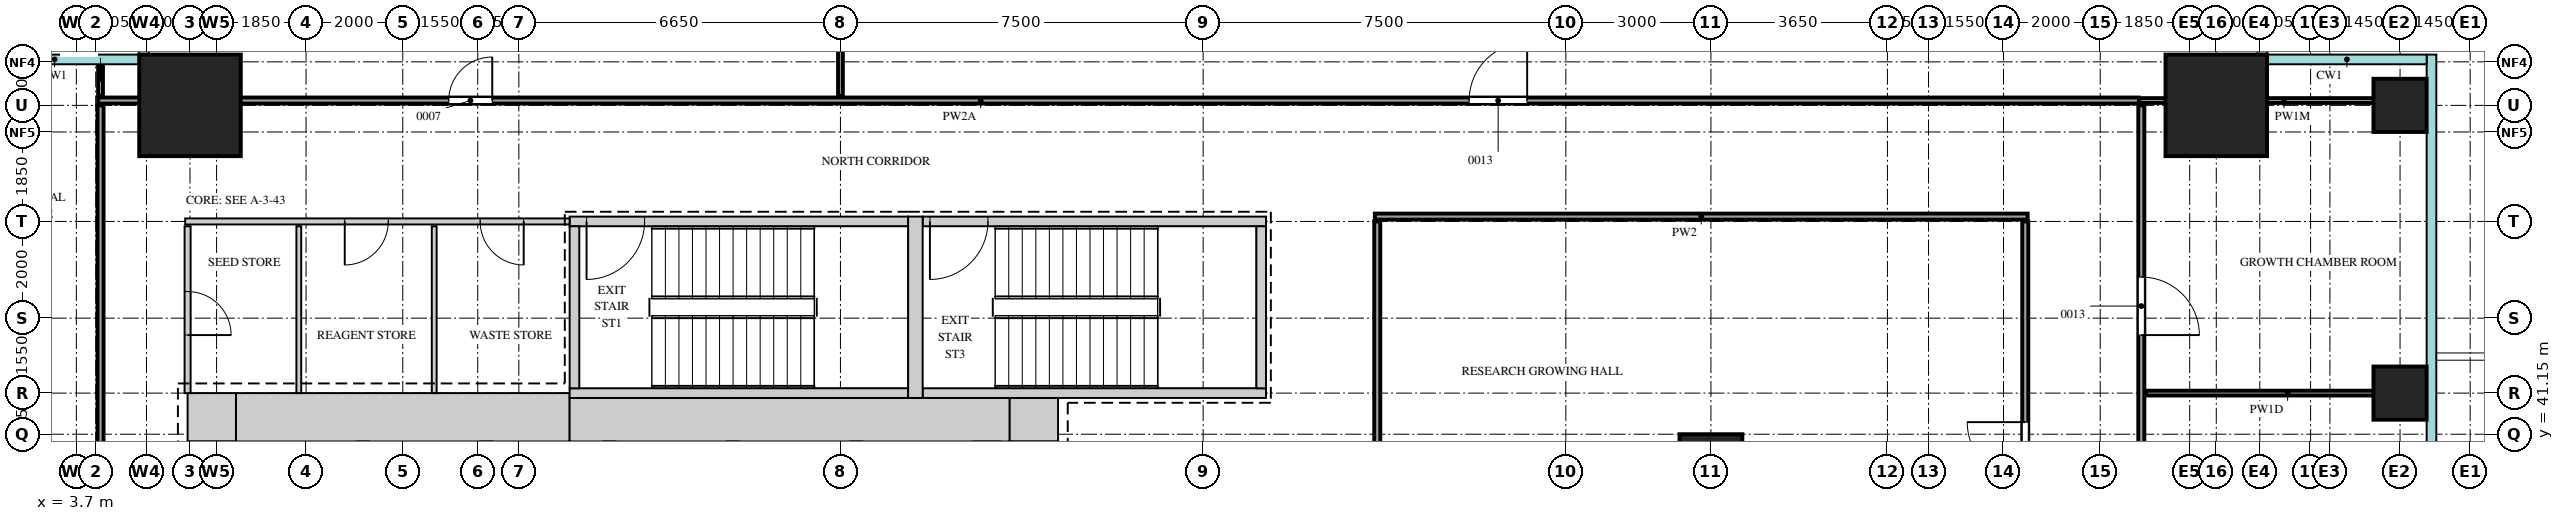
"""IFC4 building model, lengths in metres.
Left out: names, types, materials, properties, quantities, classifications, styles, units other than length and angle.
Written with IfcOpenShell. Run it as: python <this file> out.ifc"""

import sys

from ifc_helpers import new_model, si_unit, direction, frame, frame_2d, origin, origin_2d, place, context, subcontext, project, spatial, rectangle, extrude, source, transform, mapped, element, fill, save


model = new_model("IFC4")
c1 = context("Model", 3, precision=1e-05, world=origin(), true_north=direction((0.0, 1.0)))
c2 = subcontext(c1, "Body", "Model", "MODEL_VIEW")
j1 = project(units=[si_unit("LENGTHUNIT", "METRE"), si_unit("PLANEANGLEUNIT", "RADIAN")], contexts=[c1])
p1 = place(None, origin())
s1 = spatial("IfcSite", under=j1, at=p1, CompositionType="ELEMENT")
p2 = place(p1, origin())
s2 = spatial("IfcBuilding", under=s1, at=p2, CompositionType="ELEMENT")
p3 = place(p2, frame((0.0, 0.0, 110.3)))
s3 = spatial("IfcBuildingStorey", under=s2, at=p3, CompositionType="ELEMENT", Elevation=110.3)
m1 = source(origin(), c2, "Body", "SweptSolid", [
    extrude(rectangle(XDim=6.9, YDim=1.0, at=frame_2d((3.45, 0.0))), origin(), (0.0, 0.0, 1.0), 4.1),
])
p4 = place(p3, frame((7.0, 41.5, 0.0), z_axis=(0.0, 0.0, 1.0), x_axis=(1.0, 0.0, 0.0)))
e1 = element("IfcWall", 1, at=p4, inside=s3, PredefinedType="SHEAR", context=c2, shape_type="MappedRepresentation", body=[
    mapped(m1, transform((0.0, 0.0, 0.0))),
])
m2 = source(origin(), c2, "Body", "SweptSolid", [
    extrude(rectangle(XDim=9.1, YDim=0.9, at=frame_2d((4.55, 0.0))), origin(), (0.0, 0.0, 1.0), 4.1),
])
p5 = place(p3, frame((13.9, 41.45, 0.0), z_axis=(0.0, 0.0, 1.0), x_axis=(1.0, 0.0, 0.0)))
e2 = element("IfcWall", 2, at=p5, inside=s3, PredefinedType="SHEAR", context=c2, shape_type="MappedRepresentation", body=[
    mapped(m2, transform((0.0, 0.0, 0.0))),
])
m3 = source(origin(), c2, "Body", "SweptSolid", [
    extrude(rectangle(XDim=1.0, YDim=0.9, at=frame_2d((0.5, 0.0))), origin(), (0.0, 0.0, 1.0), 4.1),
])
p6 = place(p3, frame((23.0, 41.45, 0.0), z_axis=(0.0, 0.0, 1.0), x_axis=(1.0, 0.0, 0.0)))
e3 = element("IfcWall", 3, at=p6, inside=s3, PredefinedType="SHEAR", context=c2, shape_type="MappedRepresentation", body=[
    mapped(m3, transform((0.0, 0.0, 0.0))),
])
m4 = source(origin(), c2, "Body", "SweptSolid", [
    extrude(rectangle(XDim=1.0, YDim=1.0, at=frame_2d((0.5, 0.0))), origin(), (0.0, 0.0, 1.0), 4.1),
])
p7 = place(p3, frame((6.0, 41.5, 0.0), z_axis=(0.0, 0.0, 1.0), x_axis=(1.0, 0.0, 0.0)))
e4 = element("IfcWall", 4, at=p7, inside=s3, PredefinedType="SHEAR", context=c2, shape_type="MappedRepresentation", body=[
    mapped(m4, transform((0.0, 0.0, 0.0))),
])
m5 = source(origin(), c2, "Body", "SweptSolid", [
    extrude(rectangle(XDim=7.0, YDim=0.2, at=frame_2d((3.5, 0.0))), origin(), (0.0, 0.0, 1.0), 4.1),
])
p8 = place(p3, frame((13.9, 45.55, 0.0), z_axis=(0.0, 0.0, 1.0), x_axis=(1.0, 0.0, 0.0)))
e5 = element("IfcWall", 5, at=p8, inside=s3, PredefinedType="SHEAR", context=c2, shape_type="MappedRepresentation", body=[
    mapped(m5, transform((0.0, 0.0, 0.0))),
])
m6 = source(origin(), c2, "Body", "SweptSolid", [
    extrude(rectangle(XDim=1.2, YDim=2.1, at=frame_2d((0.6, 1.05))), frame((0.0, 0.11, 0.0), z_axis=(0.0, -1.0, 0.0), x_axis=(1.0, 0.0, 0.0)), (0.0, 0.0, 1.0), 0.22),
])
p9 = place(p8, frame((0.35, 0.0, 0.0)))
e6 = element("IfcOpeningElement", 6, at=p9, cuts=e5, PredefinedType="OPENING", context=c2, shape_type="MappedRepresentation", body=[
    mapped(m6, transform((0.0, 0.0, 0.0))),
])
p10 = place(p3, frame((13.9, 42.0, 0.0), z_axis=(0.0, 0.0, 1.0), x_axis=(1.0, 0.0, 0.0)))
e7 = element("IfcWall", 7, at=p10, inside=s3, PredefinedType="SHEAR", context=c2, shape_type="MappedRepresentation", body=[
    mapped(m5, transform((0.0, 0.0, 0.0))),
])
m7 = source(origin(), c2, "Body", "SweptSolid", [
    extrude(rectangle(XDim=7.1, YDim=0.2, at=frame_2d((3.55, 0.0))), origin(), (0.0, 0.0, 1.0), 4.1),
])
p11 = place(p3, frame((21.2, 45.55, 0.0), z_axis=(0.0, 0.0, 1.0), x_axis=(1.0, 0.0, 0.0)))
e8 = element("IfcWall", 8, at=p11, inside=s3, PredefinedType="SHEAR", context=c2, shape_type="MappedRepresentation", body=[
    mapped(m7, transform((0.0, 0.0, 0.0))),
])
p12 = place(p11, frame((0.15, 0.0, 0.0)))
e9 = element("IfcOpeningElement", 9, at=p12, cuts=e8, PredefinedType="OPENING", context=c2, shape_type="MappedRepresentation", body=[
    mapped(m6, transform((0.0, 0.0, 0.0))),
])
p13 = place(p3, frame((21.2, 42.0, 0.0), z_axis=(0.0, 0.0, 1.0), x_axis=(1.0, 0.0, 0.0)))
e10 = element("IfcWall", 10, at=p13, inside=s3, PredefinedType="SHEAR", context=c2, shape_type="MappedRepresentation", body=[
    mapped(m7, transform((0.0, 0.0, 0.0))),
])
m8 = source(origin(), c2, "Body", "SweptSolid", [
    extrude(rectangle(XDim=3.75, YDim=0.3, at=frame_2d((1.875, 0.0))), origin(), (0.0, 0.0, 1.0), 4.1),
])
p14 = place(p3, frame((21.05, 41.9, 0.0), z_axis=(0.0, 0.0, 1.0), x_axis=(0.0, 1.0, 0.0)))
e11 = element("IfcWall", 11, at=p14, inside=s3, PredefinedType="SHEAR", context=c2, shape_type="MappedRepresentation", body=[
    mapped(m8, transform((0.0, 0.0, 0.0))),
])
m9 = source(origin(), c2, "Body", "SweptSolid", [
    extrude(rectangle(XDim=3.35, YDim=0.2, at=frame_2d((1.675, 0.0))), origin(), (0.0, 0.0, 1.0), 4.1),
])
for number, where, z_axis, x_axis in (
    (12, (14.0, 42.1, 0.0), (0.0, 0.0, 1.0), (0.0, 1.0, 0.0)),
    (13, (28.2, 42.1, 0.0), (0.0, 0.0, 1.0), (0.0, 1.0, 0.0)),
):
    element("IfcWall", number, at=place(p3, frame(where, z_axis=z_axis, x_axis=x_axis)), inside=s3, PredefinedType="SHEAR", context=c2, shape_type="MappedRepresentation", body=[
        mapped(m9, transform((0.0, 0.0, 0.0))),
    ])
m10 = source(origin(), c2, "Body", "SweptSolid", [
    extrude(rectangle(XDim=2.1, YDim=2.1, at=origin_2d()), origin(), (0.0, 0.0, 1.0), 4.4),
])
for number, where, z_axis, x_axis in (
    (14, (47.95, 47.95, 0.0), (0.0, 0.0, 1.0), (1.0, 0.0, 0.0)),
    (15, (6.05, 47.95, 0.0), (0.0, 0.0, 1.0), (1.0, 0.0, 0.0)),
):
    element("IfcColumn", number, at=place(p3, frame(where, z_axis=z_axis, x_axis=x_axis)), inside=s3, PredefinedType="COLUMN", context=c2, shape_type="MappedRepresentation", body=[
        mapped(m10, transform((0.0, 0.0, 0.0))),
    ])
m11 = source(origin(), c2, "Body", "SweptSolid", [
    extrude(rectangle(XDim=1.1, YDim=1.1, at=origin_2d()), origin(), (0.0, 0.0, 1.0), 4.1),
])
for number, where, z_axis, x_axis in (
    (16, (51.75, 42.0, 0.0), (0.0, 0.0, 1.0), (1.0, 0.0, 0.0)),
    (17, (51.75, 47.95, 0.0), (0.0, 0.0, 1.0), (1.0, 0.0, 0.0)),
):
    element("IfcColumn", number, at=place(p3, frame(where, z_axis=z_axis, x_axis=x_axis)), inside=s3, PredefinedType="COLUMN", context=c2, shape_type="MappedRepresentation", body=[
        mapped(m11, transform((0.0, 0.0, 0.0))),
    ])
m12 = source(origin(), c2, "Body", "SweptSolid", [
    extrude(rectangle(XDim=1.3, YDim=1.3, at=origin_2d()), origin(), (0.0, 0.0, 1.0), 4.1),
])
p15 = place(p3, frame((37.5, 40.5, 0.0), z_axis=(0.0, 0.0, 1.0), x_axis=(1.0, 0.0, 0.0)))
e18 = element("IfcColumn", 18, at=p15, inside=s3, PredefinedType="COLUMN", context=c2, shape_type="MappedRepresentation", body=[
    mapped(m12, transform((0.0, 0.0, 0.0))),
])
m13 = source(origin(), c2, "Body", "SweptSolid", [
    extrude(rectangle(XDim=41.8, YDim=0.125, at=frame_2d((20.9, 0.0))), origin(), (0.0, 0.0, 1.0), 4.2),
])
p16 = place(p3, frame((4.2, 6.15, 0.0), z_axis=(0.0, 0.0, 1.0), x_axis=(0.0, 1.0, 0.0)))
e19 = element("IfcWall", 19, at=p16, inside=s3, PredefinedType="PARTITIONING", context=c2, shape_type="MappedRepresentation", body=[
    mapped(m13, transform((0.0, 0.0, 0.0))),
])
m14 = source(origin(), c2, "Body", "SweptSolid", [
    extrude(rectangle(XDim=0.9, YDim=2.1, at=frame_2d((0.45, 1.05))), frame((0.0, 0.073, 0.0), z_axis=(0.0, -1.0, 0.0), x_axis=(1.0, 0.0, 0.0)), (0.0, 0.0, 1.0), 0.145),
])
p17 = place(p16, frame((7.2, 0.0, 0.0)))
e20 = element("IfcOpeningElement", 20, at=p17, cuts=e19, PredefinedType="OPENING", context=c2, shape_type="MappedRepresentation", body=[
    mapped(m14, transform((0.0, 0.0, 0.0))),
])
p18 = place(p16, frame((21.8, 0.0, 0.0)))
e21 = element("IfcOpeningElement", 21, at=p18, cuts=e19, PredefinedType="OPENING", context=c2, shape_type="MappedRepresentation", body=[
    mapped(m14, transform((0.0, 0.0, 0.0))),
])
p19 = place(p16, frame((33.3, 0.0, 0.0)))
e22 = element("IfcOpeningElement", 22, at=p19, cuts=e19, PredefinedType="OPENING", context=c2, shape_type="MappedRepresentation", body=[
    mapped(m14, transform((0.0, 0.0, 0.0))),
])
m15 = source(origin(), c2, "Body", "SweptSolid", [
    extrude(rectangle(XDim=37.65, YDim=0.125, at=frame_2d((18.825, 0.0))), origin(), (0.0, 0.0, 1.0), 4.2),
])
p20 = place(p3, frame((46.4, 10.3, 0.0), z_axis=(0.0, 0.0, 1.0), x_axis=(0.0, 1.0, 0.0)))
e23 = element("IfcWall", 23, at=p20, inside=s3, PredefinedType="PARTITIONING", context=c2, shape_type="MappedRepresentation", body=[
    mapped(m15, transform((0.0, 0.0, 0.0))),
])
m16 = source(origin(), c2, "Body", "SweptSolid", [
    extrude(rectangle(XDim=1.2, YDim=2.1, at=frame_2d((0.6, 1.05))), frame((0.0, 0.073, 0.0), z_axis=(0.0, -1.0, 0.0), x_axis=(1.0, 0.0, 0.0)), (0.0, 0.0, 1.0), 0.145),
])
p21 = place(p20, frame((7.85, 0.0, 0.0)))
e24 = element("IfcOpeningElement", 24, at=p21, cuts=e23, PredefinedType="OPENING", context=c2, shape_type="MappedRepresentation", body=[
    mapped(m16, transform((0.0, 0.0, 0.0))),
])
p22 = place(p20, frame((23.6, 0.0, 0.0)))
e25 = element("IfcOpeningElement", 25, at=p22, cuts=e23, PredefinedType="OPENING", context=c2, shape_type="MappedRepresentation", body=[
    mapped(m16, transform((0.0, 0.0, 0.0))),
])
p23 = place(p20, frame((32.9, 0.0, 0.0)))
e26 = element("IfcOpeningElement", 26, at=p23, cuts=e23, PredefinedType="OPENING", context=c2, shape_type="MappedRepresentation", body=[
    mapped(m16, transform((0.0, 0.0, 0.0))),
])
m17 = source(origin(), c2, "Body", "SweptSolid", [
    extrude(rectangle(XDim=32.85, YDim=0.125, at=frame_2d((16.425, 0.0))), origin(), (0.0, 0.0, 1.0), 4.2),
])
p24 = place(p3, frame((44.0, 12.7, 0.0), z_axis=(0.0, 0.0, 1.0), x_axis=(0.0, 1.0, 0.0)))
e27 = element("IfcWall", 27, at=p24, inside=s3, PredefinedType="PARTITIONING", context=c2, shape_type="MappedRepresentation", body=[
    mapped(m17, transform((0.0, 0.0, 0.0))),
])
p25 = place(p24, frame((9.2, 0.0, 0.0)))
e28 = element("IfcOpeningElement", 28, at=p25, cuts=e27, PredefinedType="OPENING", context=c2, shape_type="MappedRepresentation", body=[
    mapped(m16, transform((0.0, 0.0, 0.0))),
])
p26 = place(p24, frame((27.5, 0.0, 0.0)))
e29 = element("IfcOpeningElement", 29, at=p26, cuts=e27, PredefinedType="OPENING", context=c2, shape_type="MappedRepresentation", body=[
    mapped(m16, transform((0.0, 0.0, 0.0))),
])
m18 = source(origin(), c2, "Body", "SweptSolid", [
    extrude(rectangle(XDim=9.45, YDim=0.125, at=frame_2d((4.725, 0.0))), origin(), (0.0, 0.0, 1.0), 4.2),
])
p27 = place(p3, frame((30.6, 36.1, 0.0), z_axis=(0.0, 0.0, 1.0), x_axis=(0.0, 1.0, 0.0)))
e30 = element("IfcWall", 30, at=p27, inside=s3, PredefinedType="PARTITIONING", context=c2, shape_type="MappedRepresentation", body=[
    mapped(m18, transform((0.0, 0.0, 0.0))),
])
m19 = source(origin(), c2, "Body", "SweptSolid", [
    extrude(rectangle(XDim=3.45, YDim=0.125, at=frame_2d((1.725, 0.0))), origin(), (0.0, 0.0, 1.0), 4.2),
])
p28 = place(p3, frame((6.0, 42.0, 0.0), z_axis=(0.0, 0.0, 1.0), x_axis=(0.0, 1.0, 0.0)))
e31 = element("IfcWall", 31, at=p28, inside=s3, PredefinedType="PARTITIONING", context=c2, shape_type="MappedRepresentation", body=[
    mapped(m19, transform((0.0, 0.0, 0.0))),
])
p29 = place(p28, frame((1.2, 0.0, 0.0)))
e32 = element("IfcOpeningElement", 32, at=p29, cuts=e31, PredefinedType="OPENING", context=c2, shape_type="MappedRepresentation", body=[
    mapped(m14, transform((0.0, 0.0, 0.0))),
])
m20 = source(origin(), c2, "Body", "SweptSolid", [
    extrude(rectangle(XDim=3.45, YDim=0.1, at=frame_2d((1.725, 0.0))), origin(), (0.0, 0.0, 1.0), 4.2),
])
for number, where, z_axis, x_axis in (
    (33, (8.3, 42.0, 0.0), (0.0, 0.0, 1.0), (0.0, 1.0, 0.0)),
    (34, (11.1, 42.0, 0.0), (0.0, 0.0, 1.0), (0.0, 1.0, 0.0)),
):
    element("IfcWall", number, at=place(p3, frame(where, z_axis=z_axis, x_axis=x_axis)), inside=s3, PredefinedType="PARTITIONING", context=c2, shape_type="MappedRepresentation", body=[
        mapped(m20, transform((0.0, 0.0, 0.0))),
    ])
m21 = source(origin(), c2, "Body", "SweptSolid", [
    extrude(rectangle(XDim=5.85, YDim=0.1, at=frame_2d((2.925, 0.0))), origin(), (0.0, 0.0, 1.0), 4.2),
])
p30 = place(p3, frame((46.5, 42.0, 0.0), z_axis=(0.0, 0.0, 1.0), x_axis=(1.0, 0.0, 0.0)))
e35 = element("IfcWall", 35, at=p30, inside=s3, PredefinedType="PARTITIONING", context=c2, shape_type="MappedRepresentation", body=[
    mapped(m21, transform((0.0, 0.0, 0.0))),
])
m22 = source(origin(), c2, "Body", "SweptSolid", [
    extrude(rectangle(XDim=7.95, YDim=0.125, at=frame_2d((3.975, 0.0))), origin(), (0.0, 0.0, 1.0), 4.2),
])
p31 = place(p3, frame((5.95, 45.55, 0.0), z_axis=(0.0, 0.0, 1.0), x_axis=(1.0, 0.0, 0.0)))
e36 = element("IfcWall", 36, at=p31, inside=s3, PredefinedType="PARTITIONING", context=c2, shape_type="MappedRepresentation", body=[
    mapped(m22, transform((0.0, 0.0, 0.0))),
])
p32 = place(p31, frame((3.3, 0.0, 0.0)))
e37 = element("IfcOpeningElement", 37, at=p32, cuts=e36, PredefinedType="OPENING", context=c2, shape_type="MappedRepresentation", body=[
    mapped(m14, transform((0.0, 0.0, 0.0))),
])
p33 = place(p31, frame((6.1, 0.0, 0.0)))
e38 = element("IfcOpeningElement", 38, at=p33, cuts=e36, PredefinedType="OPENING", context=c2, shape_type="MappedRepresentation", body=[
    mapped(m14, transform((0.0, 0.0, 0.0))),
])
m23 = source(origin(), c2, "Body", "SweptSolid", [
    extrude(rectangle(XDim=13.5, YDim=0.125, at=frame_2d((6.75, 0.0))), origin(), (0.0, 0.0, 1.0), 4.2),
])
p34 = place(p3, frame((30.55, 45.65, 0.0), z_axis=(0.0, 0.0, 1.0), x_axis=(1.0, 0.0, 0.0)))
e39 = element("IfcWall", 39, at=p34, inside=s3, PredefinedType="PARTITIONING", context=c2, shape_type="MappedRepresentation", body=[
    mapped(m23, transform((0.0, 0.0, 0.0))),
])
m24 = source(origin(), c2, "Body", "SweptSolid", [
    extrude(rectangle(XDim=42.2, YDim=0.125, at=frame_2d((21.1, 0.0))), origin(), (0.0, 0.0, 1.0), 3.55),
])
p35 = place(p3, frame((4.15, 48.05, 0.0), z_axis=(0.0, 0.0, 1.0), x_axis=(1.0, 0.0, 0.0)))
e40 = element("IfcWall", 40, at=p35, inside=s3, PredefinedType="PARTITIONING", context=c2, shape_type="MappedRepresentation", body=[
    mapped(m24, transform((0.0, 0.0, 0.0))),
])
p36 = place(p35, frame((7.25, 0.0, 0.0)))
e41 = element("IfcOpeningElement", 41, at=p36, cuts=e40, PredefinedType="OPENING", context=c2, shape_type="MappedRepresentation", body=[
    mapped(m14, transform((0.0, 0.0, 0.0))),
])
p37 = place(p35, frame((28.35, 0.0, 0.0)))
e42 = element("IfcOpeningElement", 42, at=p37, cuts=e40, PredefinedType="OPENING", context=c2, shape_type="MappedRepresentation", body=[
    mapped(m16, transform((0.0, 0.0, 0.0))),
])
m25 = source(origin(), c2, "Body", "SweptSolid", [
    extrude(rectangle(XDim=6.0, YDim=0.1, at=frame_2d((3.0, 0.0))), origin(), (0.0, 0.0, 1.0), 3.55),
])
p38 = place(p3, frame((46.35, 48.05, 0.0), z_axis=(0.0, 0.0, 1.0), x_axis=(1.0, 0.0, 0.0)))
e43 = element("IfcWall", 43, at=p38, inside=s3, PredefinedType="PARTITIONING", context=c2, shape_type="MappedRepresentation", body=[
    mapped(m25, transform((0.0, 0.0, 0.0))),
])
m26 = source(origin(), c2, "Body", "SweptSolid", [
    extrude(rectangle(XDim=0.7, YDim=0.1, at=frame_2d((0.35, 0.0))), origin(), (0.0, 0.0, 1.0), 4.2),
])
p39 = place(p3, frame((4.2, 48.15, 0.0), z_axis=(0.0, 0.0, 1.0), x_axis=(0.0, 1.0, 0.0)))
e44 = element("IfcWall", 44, at=p39, inside=s3, PredefinedType="PARTITIONING", context=c2, shape_type="MappedRepresentation", body=[
    mapped(m26, transform((0.0, 0.0, 0.0))),
])
m27 = source(origin(), c2, "Body", "SweptSolid", [
    extrude(rectangle(XDim=4.2, YDim=0.1, at=frame_2d((2.1, 0.0))), origin(), (0.0, 0.0, 1.0), 3.77),
])
p40 = place(p3, frame((19.5, 48.15, 0.0), z_axis=(0.0, 0.0, 1.0), x_axis=(0.0, 1.0, 0.0)))
e45 = element("IfcWall", 45, at=p40, inside=s3, PredefinedType="PARTITIONING", context=c2, shape_type="MappedRepresentation", body=[
    mapped(m27, transform((0.0, 0.0, 0.0))),
])
m28 = source(origin(), c2, "Body", "SweptSolid", [
    extrude(rectangle(XDim=1.2, YDim=2.1, at=frame_2d((0.6, 1.05))), frame((0.0, 0.025, 0.0), z_axis=(0.0, -1.0, 0.0), x_axis=(1.0, 0.0, 0.0)), (0.0, 0.0, 1.0), 0.05),
])
p41 = place(p26, origin())
e46 = element("IfcDoor", 46, at=p41, inside=s3, OperationType="SINGLE_SWING_LEFT", PredefinedType="DOOR", context=c2, shape_type="MappedRepresentation", body=[
    mapped(m28, transform((0.0, 0.0, 0.0))),
])
fill(e29, e46)
p42 = place(p23, origin())
e47 = element("IfcDoor", 47, at=p42, inside=s3, OperationType="SINGLE_SWING_LEFT", PredefinedType="DOOR", context=c2, shape_type="MappedRepresentation", body=[
    mapped(m28, transform((0.0, 0.0, 0.0))),
])
fill(e26, e47)
m29 = source(origin(), c2, "Body", "SweptSolid", [
    extrude(rectangle(XDim=0.9, YDim=2.1, at=frame_2d((0.45, 1.05))), frame((0.0, 0.025, 0.0), z_axis=(0.0, -1.0, 0.0), x_axis=(1.0, 0.0, 0.0)), (0.0, 0.0, 1.0), 0.05),
])
p43 = place(p36, origin())
e48 = element("IfcDoor", 48, at=p43, inside=s3, OperationType="SINGLE_SWING_LEFT", PredefinedType="DOOR", context=c2, shape_type="MappedRepresentation", body=[
    mapped(m29, transform((0.0, 0.0, 0.0))),
])
fill(e41, e48)
p44 = place(p37, origin())
e49 = element("IfcDoor", 49, at=p44, inside=s3, OperationType="SINGLE_SWING_LEFT", PredefinedType="DOOR", context=c2, shape_type="MappedRepresentation", body=[
    mapped(m28, transform((0.0, 0.0, 0.0))),
])
fill(e42, e49)
p45 = place(p29, origin())
e50 = element("IfcDoor", 50, at=p45, inside=s3, OperationType="SINGLE_SWING_LEFT", PredefinedType="DOOR", context=c2, shape_type="MappedRepresentation", body=[
    mapped(m29, transform((0.0, 0.0, 0.0))),
])
fill(e32, e50)
p46 = place(p32, origin())
e51 = element("IfcDoor", 51, at=p46, inside=s3, OperationType="SINGLE_SWING_LEFT", PredefinedType="DOOR", context=c2, shape_type="MappedRepresentation", body=[
    mapped(m29, transform((0.0, 0.0, 0.0))),
])
fill(e37, e51)
p47 = place(p33, origin())
e52 = element("IfcDoor", 52, at=p47, inside=s3, OperationType="SINGLE_SWING_RIGHT", PredefinedType="DOOR", context=c2, shape_type="MappedRepresentation", body=[
    mapped(m29, transform((0.0, 0.0, 0.0))),
])
fill(e38, e52)
p48 = place(p9, origin())
e53 = element("IfcDoor", 53, at=p48, inside=s3, OperationType="SINGLE_SWING_LEFT", PredefinedType="DOOR", context=c2, shape_type="MappedRepresentation", body=[
    mapped(m28, transform((0.0, 0.0, 0.0))),
])
fill(e6, e53)
p49 = place(p12, origin())
e54 = element("IfcDoor", 54, at=p49, inside=s3, OperationType="SINGLE_SWING_LEFT", PredefinedType="DOOR", context=c2, shape_type="MappedRepresentation", body=[
    mapped(m28, transform((0.0, 0.0, 0.0))),
])
fill(e9, e54)
save(model, sys.argv[1])
